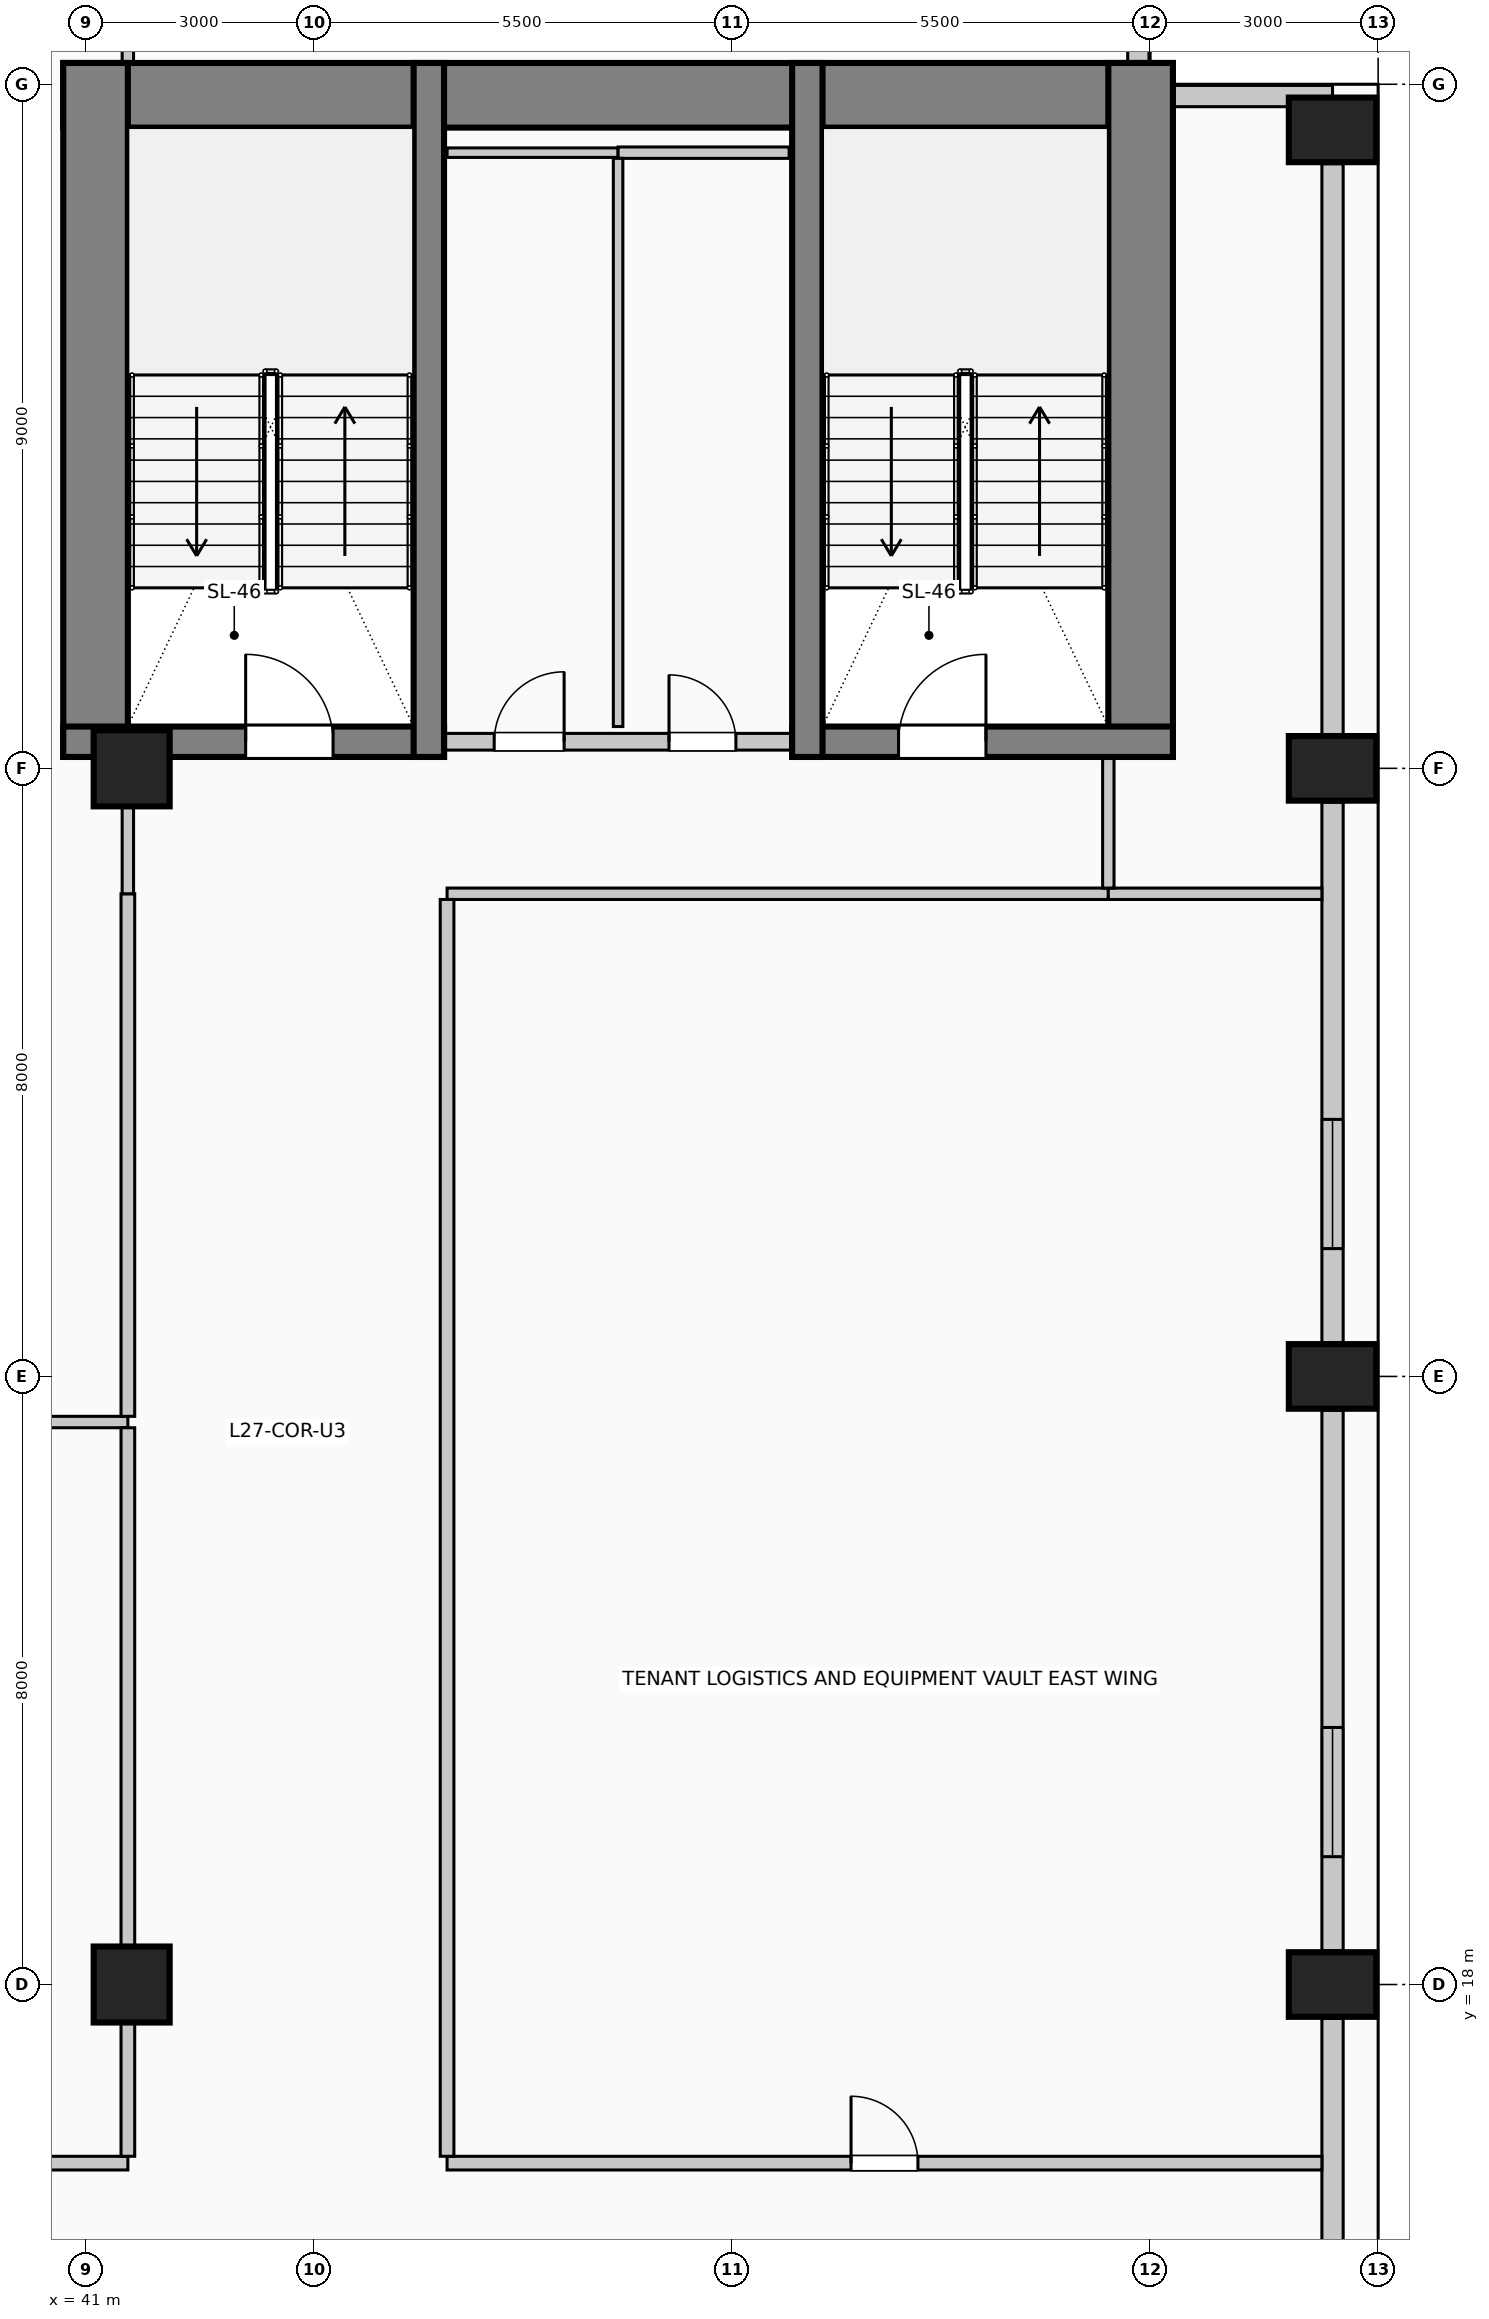
"""IFC4 building model, lengths in metres.
Left out: names, types, materials, properties, quantities, classifications, styles, units other than length and angle.
Written with IfcOpenShell. Run it as: python <this file> out.ifc"""

import sys

from ifc_helpers import new_model, si_unit, direction, frame, frame_2d, origin, origin_2d, place, context, subcontext, project, spatial, rectangle, circle, extrude, element, fill, save


model = new_model("IFC4")
c1 = context("Model", 3, precision=1e-05, world=origin(), true_north=direction((0.0, 1.0)))
c2 = subcontext(c1, "Body", "Model", "MODEL_VIEW")
j1 = project(units=[si_unit("LENGTHUNIT", "METRE"), si_unit("PLANEANGLEUNIT", "RADIAN")], contexts=[c1])
p1 = place(None, origin())
s1 = spatial("IfcSite", under=j1, at=p1, CompositionType="ELEMENT")
p2 = place(p1, origin())
s2 = spatial("IfcBuilding", under=s1, at=p2, CompositionType="ELEMENT")
p3 = place(p2, frame((0.0, 0.0, 112.6)))
s3 = spatial("IfcBuildingStorey", under=s2, at=p3, CompositionType="ELEMENT", Elevation=112.6)
p4 = place(p3, frame((40.7, 42.855, 0.0), z_axis=(0.0, 0.0, 1.0), x_axis=(1.0, 0.0, 0.0)))
e1 = element("IfcWall", 1, at=p4, inside=s3, PredefinedType="SHEAR", context=c2, shape_type="SweptSolid", body=[
    extrude(rectangle(XDim=14.6, YDim=0.85, at=frame_2d((7.3, 0.0))), origin(), (0.0, 0.0, 1.0), 4.0),
])
for number, where, z_axis, x_axis in (
    (2, (41.125, 34.15, 0.0), (0.0, 0.0, 1.0), (0.0, 1.0, 0.0)),
    (3, (54.875, 34.15, 0.0), (0.0, 0.0, 1.0), (0.0, 1.0, 0.0)),
):
    element("IfcWall", number, at=place(p3, frame(where, z_axis=z_axis, x_axis=x_axis)), inside=s3, PredefinedType="SHEAR", context=c2, shape_type="SweptSolid", body=[
        extrude(rectangle(XDim=9.13, YDim=0.85, at=frame_2d((4.565, 0.0))), origin(), (0.0, 0.0, 1.0), 4.0),
    ])
p5 = place(p3, frame((40.7, 34.35, 0.0), z_axis=(0.0, 0.0, 1.0), x_axis=(1.0, 0.0, 0.0)))
e4 = element("IfcWall", 4, at=p5, inside=s3, PredefinedType="SHEAR", context=c2, shape_type="SweptSolid", body=[
    extrude(rectangle(XDim=5.01, YDim=0.4, at=frame_2d((2.505, 0.0))), origin(), (0.0, 0.0, 1.0), 4.0),
])
p6 = place(p5, frame((2.4, 0.0, 0.0)))
e5 = element("IfcOpeningElement", 5, at=p6, cuts=e4, PredefinedType="OPENING", context=c2, shape_type="SweptSolid", body=[
    extrude(rectangle(XDim=1.15, YDim=2.2, at=frame_2d((0.575, 1.1))), frame((0.0, 0.21, 0.0), z_axis=(0.0, -1.0, 0.0), x_axis=(1.0, 0.0, 0.0)), (0.0, 0.0, 1.0), 0.42),
])
p7 = place(p3, frame((45.51, 34.15, 0.0), z_axis=(0.0, 0.0, 1.0), x_axis=(0.0, 1.0, 0.0)))
e6 = element("IfcWall", 6, at=p7, inside=s3, PredefinedType="SHEAR", context=c2, shape_type="SweptSolid", body=[
    extrude(rectangle(XDim=9.13, YDim=0.4, at=frame_2d((4.565, 0.0))), origin(), (0.0, 0.0, 1.0), 4.0),
])
p8 = place(p3, frame((50.29, 34.35, 0.0), z_axis=(0.0, 0.0, 1.0), x_axis=(1.0, 0.0, 0.0)))
e7 = element("IfcWall", 7, at=p8, inside=s3, PredefinedType="SHEAR", context=c2, shape_type="SweptSolid", body=[
    extrude(rectangle(XDim=5.01, YDim=0.4, at=frame_2d((2.505, 0.0))), origin(), (0.0, 0.0, 1.0), 4.0),
])
p9 = place(p8, frame((1.4, 0.0, 0.0)))
e8 = element("IfcOpeningElement", 8, at=p9, cuts=e7, PredefinedType="OPENING", context=c2, shape_type="SweptSolid", body=[
    extrude(rectangle(XDim=1.15, YDim=2.2, at=frame_2d((0.575, 1.1))), frame((0.0, 0.21, 0.0), z_axis=(0.0, -1.0, 0.0), x_axis=(1.0, 0.0, 0.0)), (0.0, 0.0, 1.0), 0.42),
])
p10 = place(p3, frame((50.49, 34.15, 0.0), z_axis=(0.0, 0.0, 1.0), x_axis=(0.0, 1.0, 0.0)))
e9 = element("IfcWall", 9, at=p10, inside=s3, PredefinedType="SHEAR", context=c2, shape_type="SweptSolid", body=[
    extrude(rectangle(XDim=9.13, YDim=0.4, at=frame_2d((4.565, 0.0))), origin(), (0.0, 0.0, 1.0), 4.0),
])
for number, where, z_axis, x_axis in (
    (10, (57.4, 18.0, 0.0), (0.0, 0.0, 1.0), (0.0, 1.0, 0.0)),
    (11, (57.4, 26.0, 0.0), (0.0, 0.0, 1.0), (0.0, 1.0, 0.0)),
    (12, (57.4, 34.0, 0.0), (0.0, 0.0, 1.0), (0.0, 1.0, 0.0)),
    (13, (57.4, 42.4, 0.0), (0.0, 0.0, 1.0), (0.0, 1.0, 0.0)),
):
    element("IfcColumn", number, at=place(p3, frame(where, z_axis=z_axis, x_axis=x_axis)), inside=s3, PredefinedType="COLUMN", context=c2, shape_type="SweptSolid", body=[
        extrude(rectangle(XDim=0.85, YDim=1.15, at=origin_2d()), origin(), (0.0, 0.0, 1.0), 4.0),
    ])
for number, where, z_axis, x_axis in (
    (14, (41.6, 18.0, 0.0), (0.0, 0.0, 1.0), (1.0, 0.0, 0.0)),
    (15, (41.6, 34.0, 0.0), (0.0, 0.0, 1.0), (1.0, 0.0, 0.0)),
):
    element("IfcColumn", number, at=place(p3, frame(where, z_axis=z_axis, x_axis=x_axis)), inside=s3, PredefinedType="COLUMN", context=c2, shape_type="SweptSolid", body=[
        extrude(circle(Radius=0.5, at=origin_2d()), origin(), (0.0, 0.0, 1.0), 4.0),
    ])
p11 = place(p3, frame((57.4, 17.555, 0.0), z_axis=(0.0, 0.0, 1.0), x_axis=(0.0, -1.0, 0.0)))
e16 = element("IfcWall", 16, at=p11, inside=s3, PredefinedType="SOLIDWALL", context=c2, shape_type="SweptSolid", body=[
    extrude(rectangle(XDim=7.11, YDim=0.28, at=frame_2d((3.555, 0.0))), origin(), (0.0, 0.0, 1.0), 2.875),
])
p12 = place(p3, frame((57.4, 25.555, 0.0), z_axis=(0.0, 0.0, 1.0), x_axis=(0.0, -1.0, 0.0)))
e17 = element("IfcWall", 17, at=p12, inside=s3, PredefinedType="SOLIDWALL", context=c2, shape_type="SweptSolid", body=[
    extrude(rectangle(XDim=7.11, YDim=0.28, at=frame_2d((3.555, 0.0))), origin(), (0.0, 0.0, 1.0), 2.875),
])
p13 = place(p12, frame((4.173, 0.0, 0.5)))
e18 = element("IfcOpeningElement", 18, at=p13, cuts=e17, PredefinedType="OPENING", context=c2, shape_type="SweptSolid", body=[
    extrude(rectangle(XDim=1.7, YDim=1.95, at=frame_2d((0.85, 0.975))), frame((0.0, 0.15, 0.0), z_axis=(0.0, -1.0, 0.0), x_axis=(1.0, 0.0, 0.0)), (0.0, 0.0, 1.0), 0.3),
])
p14 = place(p3, frame((57.4, 33.555, 0.0), z_axis=(0.0, 0.0, 1.0), x_axis=(0.0, -1.0, 0.0)))
e19 = element("IfcWall", 19, at=p14, inside=s3, PredefinedType="SOLIDWALL", context=c2, shape_type="SweptSolid", body=[
    extrude(rectangle(XDim=7.11, YDim=0.28, at=frame_2d((3.555, 0.0))), origin(), (0.0, 0.0, 1.0), 2.875),
])
p15 = place(p14, frame((4.173, 0.0, 0.5)))
e20 = element("IfcOpeningElement", 20, at=p15, cuts=e19, PredefinedType="OPENING", context=c2, shape_type="SweptSolid", body=[
    extrude(rectangle(XDim=1.7, YDim=1.95, at=frame_2d((0.85, 0.975))), frame((0.0, 0.15, 0.0), z_axis=(0.0, -1.0, 0.0), x_axis=(1.0, 0.0, 0.0)), (0.0, 0.0, 1.0), 0.3),
])
p16 = place(p3, frame((57.4, 41.955, 0.0), z_axis=(0.0, 0.0, 1.0), x_axis=(0.0, -1.0, 0.0)))
e21 = element("IfcWall", 21, at=p16, inside=s3, PredefinedType="SOLIDWALL", context=c2, shape_type="SweptSolid", body=[
    extrude(rectangle(XDim=7.51, YDim=0.28, at=frame_2d((3.755, 0.0))), origin(), (0.0, 0.0, 1.0), 2.875),
])
p17 = place(p3, frame((54.845, 45.4, 0.0), z_axis=(0.0, 0.0, 1.0), x_axis=(0.0, -1.0, 0.0)))
e22 = element("IfcWall", 22, at=p17, inside=s3, PredefinedType="SOLIDWALL", context=c2, shape_type="SweptSolid", body=[
    extrude(rectangle(XDim=2.115, YDim=0.28, at=frame_2d((1.058, 0.0))), origin(), (0.0, 0.0, 1.0), 3.725),
])
p18 = place(p3, frame((55.305, 42.845, 0.0), z_axis=(0.0, 0.0, 1.0), x_axis=(1.0, 0.0, 0.0)))
e23 = element("IfcWall", 23, at=p18, inside=s3, PredefinedType="SOLIDWALL", context=c2, shape_type="SweptSolid", body=[
    extrude(rectangle(XDim=2.095, YDim=0.28, at=frame_2d((1.047, 0.0))), origin(), (0.0, 0.0, 1.0), 3.725),
])
p19 = place(p3, frame((45.72, 34.35, 0.0), z_axis=(0.0, 0.0, 1.0), x_axis=(1.0, 0.0, 0.0)))
e24 = element("IfcWall", 24, at=p19, inside=s3, PredefinedType="PARTITIONING", context=c2, shape_type="SweptSolid", body=[
    extrude(rectangle(XDim=4.56, YDim=0.22, at=frame_2d((2.28, 0.0))), origin(), (0.0, 0.0, 1.0), 3.725),
])
p20 = place(p19, frame((0.65, 0.0, 0.0)))
e25 = element("IfcOpeningElement", 25, at=p20, cuts=e24, PredefinedType="OPENING", context=c2, shape_type="SweptSolid", body=[
    extrude(rectangle(XDim=0.92, YDim=2.1, at=frame_2d((0.46, 1.05))), frame((0.0, 0.12, 0.0), z_axis=(0.0, -1.0, 0.0), x_axis=(1.0, 0.0, 0.0)), (0.0, 0.0, 1.0), 0.24),
])
p21 = place(p19, frame((2.95, 0.0, 0.0)))
e26 = element("IfcOpeningElement", 26, at=p21, cuts=e24, PredefinedType="OPENING", context=c2, shape_type="SweptSolid", body=[
    extrude(rectangle(XDim=0.88, YDim=2.1, at=frame_2d((0.44, 1.05))), frame((0.0, 0.12, 0.0), z_axis=(0.0, -1.0, 0.0), x_axis=(1.0, 0.0, 0.0)), (0.0, 0.0, 1.0), 0.24),
])
p22 = place(p3, frame((27.5, 15.65, 0.0), z_axis=(0.0, 0.0, 1.0), x_axis=(1.0, 0.0, 0.0)))
e27 = element("IfcWall", 27, at=p22, inside=s3, PredefinedType="PARTITIONING", context=c2, shape_type="SweptSolid", body=[
    extrude(rectangle(XDim=14.05, YDim=0.18, at=frame_2d((7.025, 0.0))), origin(), (0.0, 0.0, 1.0), 3.725),
])
p23 = place(p22, frame((6.55, 0.0, 0.0)))
e28 = element("IfcOpeningElement", 28, at=p23, cuts=e27, PredefinedType="OPENING", context=c2, shape_type="SweptSolid", body=[
    extrude(rectangle(XDim=0.95, YDim=2.15, at=frame_2d((0.475, 1.075))), frame((0.0, 0.1, 0.0), z_axis=(0.0, -1.0, 0.0), x_axis=(1.0, 0.0, 0.0)), (0.0, 0.0, 1.0), 0.2),
])
p24 = place(p3, frame((45.75, 15.65, 0.0), z_axis=(0.0, 0.0, 1.0), x_axis=(1.0, 0.0, 0.0)))
e29 = element("IfcWall", 29, at=p24, inside=s3, PredefinedType="PARTITIONING", context=c2, shape_type="SweptSolid", body=[
    extrude(rectangle(XDim=11.51, YDim=0.18, at=frame_2d((5.755, 0.0))), origin(), (0.0, 0.0, 1.0), 3.725),
])
p25 = place(p24, frame((5.315, 0.0, 0.0)))
e30 = element("IfcOpeningElement", 30, at=p25, cuts=e29, PredefinedType="OPENING", context=c2, shape_type="SweptSolid", body=[
    extrude(rectangle(XDim=0.88, YDim=2.1, at=frame_2d((0.44, 1.05))), frame((0.0, 0.1, 0.0), z_axis=(0.0, -1.0, 0.0), x_axis=(1.0, 0.0, 0.0)), (0.0, 0.0, 1.0), 0.2),
])
p26 = place(p3, frame((27.5, 25.4, 0.0), z_axis=(0.0, 0.0, 1.0), x_axis=(1.0, 0.0, 0.0)))
e31 = element("IfcWall", 31, at=p26, inside=s3, PredefinedType="PARTITIONING", context=c2, shape_type="SweptSolid", body=[
    extrude(rectangle(XDim=14.05, YDim=0.15, at=frame_2d((7.025, 0.0))), origin(), (0.0, 0.0, 1.0), 3.17),
])
p27 = place(p3, frame((45.75, 32.35, 0.0), z_axis=(0.0, 0.0, 1.0), x_axis=(1.0, 0.0, 0.0)))
e32 = element("IfcWall", 32, at=p27, inside=s3, PredefinedType="PARTITIONING", context=c2, shape_type="SweptSolid", body=[
    extrude(rectangle(XDim=8.7, YDim=0.15, at=frame_2d((4.35, 0.0))), origin(), (0.0, 0.0, 1.0), 3.725),
])
p28 = place(p3, frame((54.45, 32.35, 0.0), z_axis=(0.0, 0.0, 1.0), x_axis=(1.0, 0.0, 0.0)))
e33 = element("IfcWall", 33, at=p28, inside=s3, PredefinedType="PARTITIONING", context=c2, shape_type="SweptSolid", body=[
    extrude(rectangle(XDim=2.81, YDim=0.15, at=frame_2d((1.405, 0.0))), origin(), (0.0, 0.0, 1.0), 3.725),
])
p29 = place(p3, frame((45.75, 42.1, 0.0), z_axis=(0.0, 0.0, 1.0), x_axis=(1.0, 0.0, 0.0)))
e34 = element("IfcWall", 34, at=p29, inside=s3, PredefinedType="PARTITIONING", context=c2, shape_type="SweptSolid", body=[
    extrude(rectangle(XDim=2.25, YDim=0.125, at=frame_2d((1.125, 0.0))), origin(), (0.0, 0.0, 1.0), 3.725),
])
p30 = place(p3, frame((48.0, 42.1, 0.0), z_axis=(0.0, 0.0, 1.0), x_axis=(1.0, 0.0, 0.0)))
e35 = element("IfcWall", 35, at=p30, inside=s3, PredefinedType="PARTITIONING", context=c2, shape_type="SweptSolid", body=[
    extrude(rectangle(XDim=2.25, YDim=0.15, at=frame_2d((1.125, 0.0))), origin(), (0.0, 0.0, 1.0), 3.725),
])
p31 = place(p3, frame((41.55, 15.74, 0.0), z_axis=(0.0, 0.0, 1.0), x_axis=(0.0, 1.0, 0.0)))
e36 = element("IfcWall", 36, at=p31, inside=s3, PredefinedType="PARTITIONING", context=c2, shape_type="SweptSolid", body=[
    extrude(rectangle(XDim=1.76, YDim=0.18, at=frame_2d((0.88, 0.0))), origin(), (0.0, 0.0, 1.0), 3.07),
])
p32 = place(p3, frame((41.55, 18.5, 0.0), z_axis=(0.0, 0.0, 1.0), x_axis=(0.0, 1.0, 0.0)))
e37 = element("IfcWall", 37, at=p32, inside=s3, PredefinedType="PARTITIONING", context=c2, shape_type="SweptSolid", body=[
    extrude(rectangle(XDim=6.825, YDim=0.18, at=frame_2d((3.413, 0.0))), origin(), (0.0, 0.0, 1.0), 3.07),
])
p33 = place(p3, frame((41.55, 25.475, 0.0), z_axis=(0.0, 0.0, 1.0), x_axis=(0.0, 1.0, 0.0)))
e38 = element("IfcWall", 38, at=p33, inside=s3, PredefinedType="PARTITIONING", context=c2, shape_type="SweptSolid", body=[
    extrude(rectangle(XDim=6.875, YDim=0.18, at=frame_2d((3.438, 0.0))), origin(), (0.0, 0.0, 1.0), 3.07),
])
p34 = place(p3, frame((41.55, 32.35, 0.0), z_axis=(0.0, 0.0, 1.0), x_axis=(0.0, 1.0, 0.0)))
e39 = element("IfcWall", 39, at=p34, inside=s3, PredefinedType="PARTITIONING", context=c2, shape_type="SweptSolid", body=[
    extrude(rectangle(XDim=1.15, YDim=0.15, at=frame_2d((0.575, 0.0))), origin(), (0.0, 0.0, 1.0), 3.07),
])
p35 = place(p3, frame((41.55, 43.28, 0.0), z_axis=(0.0, 0.0, 1.0), x_axis=(0.0, 1.0, 0.0)))
e40 = element("IfcWall", 40, at=p35, inside=s3, PredefinedType="PARTITIONING", context=c2, shape_type="SweptSolid", body=[
    extrude(rectangle(XDim=1.42, YDim=0.15, at=frame_2d((0.71, 0.0))), origin(), (0.0, 0.0, 1.0), 3.725),
])
p36 = place(p3, frame((45.75, 15.74, 0.0), z_axis=(0.0, 0.0, 1.0), x_axis=(0.0, 1.0, 0.0)))
e41 = element("IfcWall", 41, at=p36, inside=s3, PredefinedType="PARTITIONING", context=c2, shape_type="SweptSolid", body=[
    extrude(rectangle(XDim=16.535, YDim=0.18, at=frame_2d((8.268, 0.0))), origin(), (0.0, 0.0, 1.0), 3.725),
])
p37 = place(p3, frame((48.0, 34.55, 0.0), z_axis=(0.0, 0.0, 1.0), x_axis=(0.0, 1.0, 0.0)))
e42 = element("IfcWall", 42, at=p37, inside=s3, PredefinedType="PARTITIONING", context=c2, shape_type="SweptSolid", body=[
    extrude(rectangle(XDim=7.475, YDim=0.125, at=frame_2d((3.737, 0.0))), origin(), (0.0, 0.0, 1.0), 3.725),
])
p38 = place(p3, frame((54.45, 32.425, 0.0), z_axis=(0.0, 0.0, 1.0), x_axis=(0.0, 1.0, 0.0)))
e43 = element("IfcWall", 43, at=p38, inside=s3, PredefinedType="PARTITIONING", context=c2, shape_type="SweptSolid", body=[
    extrude(rectangle(XDim=1.725, YDim=0.15, at=frame_2d((0.862, 0.0))), origin(), (0.0, 0.0, 1.0), 3.725),
])
p39 = place(p13, origin())
e44 = element("IfcWindow", 44, at=p39, inside=s3, PartitioningType="SINGLE_PANEL", PredefinedType="WINDOW", context=c2, shape_type="SweptSolid", body=[
    extrude(rectangle(XDim=1.7, YDim=1.95, at=frame_2d((0.85, 0.975))), frame((0.0, 0.03, 0.0), z_axis=(0.0, -1.0, 0.0), x_axis=(1.0, 0.0, 0.0)), (0.0, 0.0, 1.0), 0.06),
])
fill(e18, e44)
p40 = place(p15, origin())
e45 = element("IfcWindow", 45, at=p40, inside=s3, PartitioningType="SINGLE_PANEL", PredefinedType="WINDOW", context=c2, shape_type="SweptSolid", body=[
    extrude(rectangle(XDim=1.7, YDim=1.95, at=frame_2d((0.85, 0.975))), frame((0.0, 0.03, 0.0), z_axis=(0.0, -1.0, 0.0), x_axis=(1.0, 0.0, 0.0)), (0.0, 0.0, 1.0), 0.06),
])
fill(e20, e45)
p41 = place(p6, origin())
e46 = element("IfcDoor", 46, at=p41, inside=s3, OperationType="SINGLE_SWING_LEFT", PredefinedType="DOOR", context=c2, shape_type="SweptSolid", body=[
    extrude(rectangle(XDim=1.15, YDim=2.2, at=frame_2d((0.575, 1.1))), frame((0.0, 0.025, 0.0), z_axis=(0.0, -1.0, 0.0), x_axis=(1.0, 0.0, 0.0)), (0.0, 0.0, 1.0), 0.05),
])
fill(e5, e46)
p42 = place(p20, origin())
e47 = element("IfcDoor", 47, at=p42, inside=s3, OperationType="SINGLE_SWING_RIGHT", PredefinedType="DOOR", context=c2, shape_type="SweptSolid", body=[
    extrude(rectangle(XDim=0.92, YDim=2.1, at=frame_2d((0.46, 1.05))), frame((0.0, 0.025, 0.0), z_axis=(0.0, -1.0, 0.0), x_axis=(1.0, 0.0, 0.0)), (0.0, 0.0, 1.0), 0.05),
])
fill(e25, e47)
p43 = place(p21, origin())
e48 = element("IfcDoor", 48, at=p43, inside=s3, OperationType="SINGLE_SWING_LEFT", PredefinedType="DOOR", context=c2, shape_type="SweptSolid", body=[
    extrude(rectangle(XDim=0.88, YDim=2.1, at=frame_2d((0.44, 1.05))), frame((0.0, 0.025, 0.0), z_axis=(0.0, -1.0, 0.0), x_axis=(1.0, 0.0, 0.0)), (0.0, 0.0, 1.0), 0.05),
])
fill(e26, e48)
p44 = place(p9, origin())
e49 = element("IfcDoor", 49, at=p44, inside=s3, OperationType="SINGLE_SWING_RIGHT", PredefinedType="DOOR", context=c2, shape_type="SweptSolid", body=[
    extrude(rectangle(XDim=1.15, YDim=2.2, at=frame_2d((0.575, 1.1))), frame((0.0, 0.025, 0.0), z_axis=(0.0, -1.0, 0.0), x_axis=(1.0, 0.0, 0.0)), (0.0, 0.0, 1.0), 0.05),
])
fill(e8, e49)
p45 = place(p25, origin())
e50 = element("IfcDoor", 50, at=p45, inside=s3, OperationType="SINGLE_SWING_LEFT", PredefinedType="DOOR", context=c2, shape_type="SweptSolid", body=[
    extrude(rectangle(XDim=0.88, YDim=2.1, at=frame_2d((0.44, 1.05))), frame((0.0, 0.025, 0.0), z_axis=(0.0, -1.0, 0.0), x_axis=(1.0, 0.0, 0.0)), (0.0, 0.0, 1.0), 0.05),
])
fill(e30, e50)
save(model, sys.argv[1])
